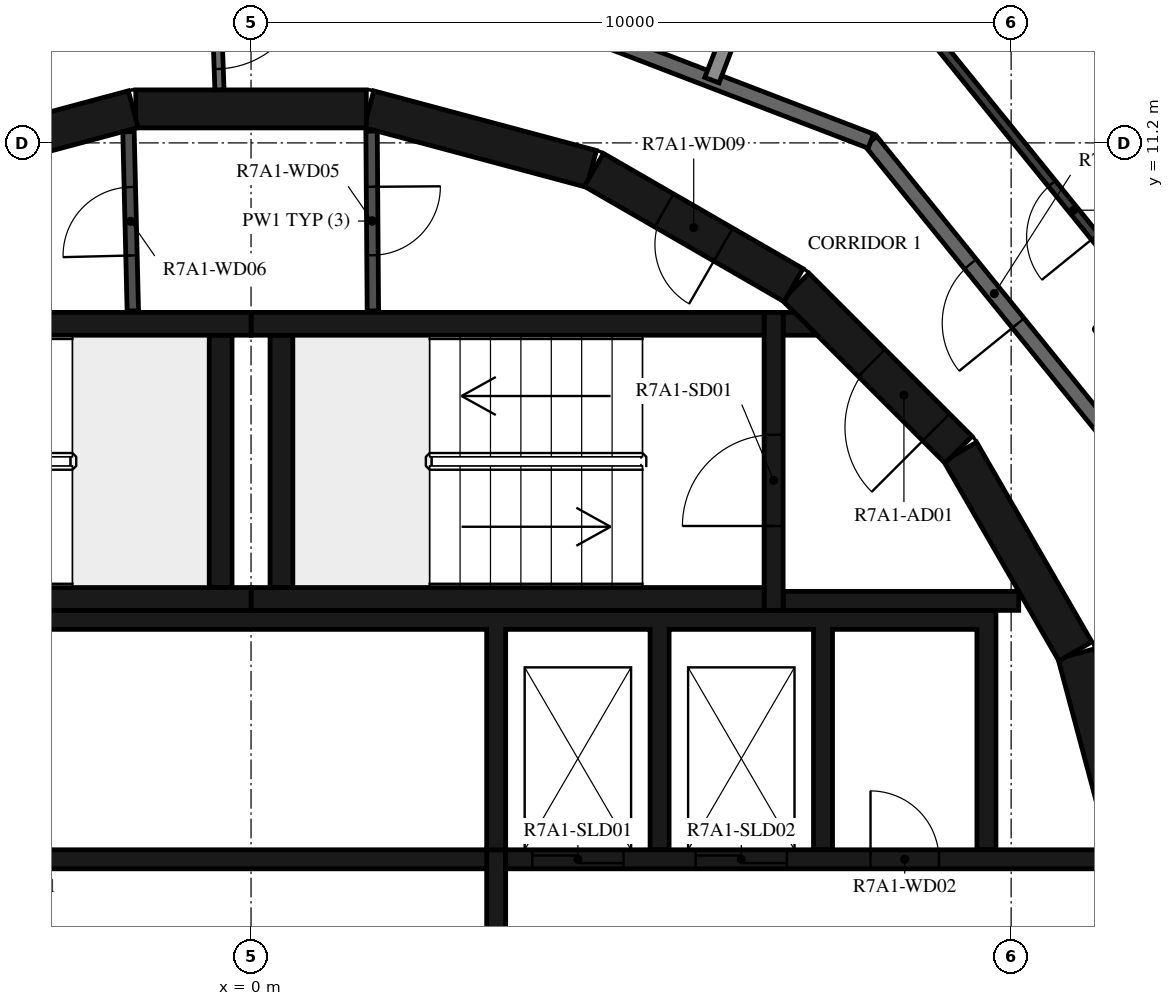
"""IFC4 building model, lengths in metres.
Left out: names, types, materials, properties, quantities, classifications, styles, units other than length and angle.
Written with IfcOpenShell. Run it as: python <this file> out.ifc"""

import sys

from ifc_helpers import new_model, si_unit, direction, frame, frame_2d, origin, place, context, subcontext, project, spatial, polyline, rectangle, outline, extrude, element, fill, save


model = new_model("IFC4")
c1 = context("Model", 3, precision=1e-05, world=origin(), true_north=direction((0.0, 1.0)))
c2 = subcontext(c1, "Body", "Model", "MODEL_VIEW")
j1 = project(units=[si_unit("LENGTHUNIT", "METRE"), si_unit("PLANEANGLEUNIT", "RADIAN")], contexts=[c1])
p1 = place(None, origin())
s1 = spatial("IfcSite", under=j1, at=p1, CompositionType="ELEMENT")
p2 = place(p1, origin())
s2 = spatial("IfcBuilding", under=s1, at=p2, CompositionType="ELEMENT")
p3 = place(p2, frame((0.0, 0.0, 266.9)))
s3 = spatial("IfcBuildingStorey", under=s2, at=p3, CompositionType="ELEMENT", Elevation=266.9)
for number, where, z_axis, x_axis in (
    (1, (11.643, 1.55, 0.0), (0.0, 0.0, 1.0), (-0.259, 0.966, 0.0)),
    (2, (10.845, 4.51, 0.0), (0.0, 0.0, 1.0), (-0.5, 0.866, 0.0)),
):
    element("IfcWall", number, at=place(p3, frame(where, z_axis=z_axis, x_axis=x_axis)), inside=s3, PredefinedType="SHEAR", context=c2, shape_type="SweptSolid", body=[
        extrude(rectangle(XDim=3.033, YDim=0.5, at=frame_2d((1.516, 0.0))), origin(), (0.0, 0.0, 1.0), 3.12),
    ])
p4 = place(p3, frame((9.308, 7.164, 0.0), z_axis=(0.0, 0.0, 1.0), x_axis=(-0.707106781187, 0.707106781187, 0.0)))
e3 = element("IfcWall", 3, at=p4, inside=s3, PredefinedType="SHEAR", context=c2, shape_type="SweptSolid", body=[
    extrude(rectangle(XDim=3.032, YDim=0.5, at=frame_2d((1.516, 0.0))), origin(), (0.0, 0.0, 1.0), 3.12),
])
p5 = place(p4, frame((0.416, 0.0, 0.0)))
e4 = element("IfcOpeningElement", 4, at=p5, cuts=e3, PredefinedType="OPENING", context=c2, shape_type="SweptSolid", body=[
    extrude(rectangle(XDim=1.2, YDim=2.1, at=frame_2d((0.6, 1.05))), frame((0.0, 0.26, 0.0), z_axis=(0.0, -1.0, 0.0), x_axis=(1.0, 0.0, 0.0)), (0.0, 0.0, 1.0), 0.52),
])
p6 = place(p3, frame((7.137, 9.329, 0.0), z_axis=(0.0, 0.0, 1.0), x_axis=(-0.865975092491, 0.500087131594, 0.0)))
e5 = element("IfcWall", 5, at=p6, inside=s3, PredefinedType="SHEAR", context=c2, shape_type="SweptSolid", body=[
    extrude(rectangle(XDim=3.033, YDim=0.5, at=frame_2d((1.516, 0.0))), origin(), (0.0, 0.0, 1.0), 3.12),
])
p7 = place(p6, frame((1.066, 0.0, 0.0)))
e6 = element("IfcOpeningElement", 6, at=p7, cuts=e5, PredefinedType="OPENING", context=c2, shape_type="SweptSolid", body=[
    extrude(rectangle(XDim=0.9, YDim=2.1, at=frame_2d((0.45, 1.05))), frame((0.0, 0.26, 0.0), z_axis=(0.0, -1.0, 0.0), x_axis=(1.0, 0.0, 0.0)), (0.0, 0.0, 1.0), 0.52),
])
for number, where, z_axis, x_axis in (
    (7, (4.479, 10.858, 0.0), (0.0, 0.0, 1.0), (-0.966, 0.259, 0.0)),
    (8, (1.516, 11.647, 0.0), (0.0, 0.0, 1.0), (-1.0, 0.0, 0.0)),
    (9, (-1.55, 11.643, 0.0), (0.0, 0.0, 1.0), (-0.966, -0.259, 0.0)),
):
    element("IfcWall", number, at=place(p3, frame(where, z_axis=z_axis, x_axis=x_axis)), inside=s3, PredefinedType="SHEAR", context=c2, shape_type="SweptSolid", body=[
        extrude(rectangle(XDim=3.033, YDim=0.5, at=frame_2d((1.516, 0.0))), origin(), (0.0, 0.0, 1.0), 3.12),
    ])
for number, where, z_axis, x_axis in (
    (10, (0.0, 5.2, 0.0), (0.0, 0.0, 1.0), (1.0, 0.0, 0.0)),
    (11, (0.0, 8.82, 0.0), (0.0, 0.0, 1.0), (1.0, 0.0, 0.0)),
):
    element("IfcWall", number, at=place(p3, frame(where, z_axis=z_axis, x_axis=x_axis)), inside=s3, PredefinedType="SHEAR", context=c2, shape_type="SweptSolid", body=[
        extrude(rectangle(XDim=6.75, YDim=0.3, at=frame_2d((3.375, 0.0))), origin(), (0.0, 0.0, 1.0), 3.12),
    ])
p8 = place(p3, frame((0.4, 5.35, 0.0), z_axis=(0.0, 0.0, 1.0), x_axis=(0.0, 1.0, 0.0)))
e12 = element("IfcWall", 12, at=p8, inside=s3, PredefinedType="SHEAR", context=c2, shape_type="SweptSolid", body=[
    extrude(rectangle(XDim=3.32, YDim=0.3, at=frame_2d((1.66, 0.0))), origin(), (0.0, 0.0, 1.0), 3.12),
])
p9 = place(p3, frame((6.875, 5.05, 0.0), z_axis=(0.0, 0.0, 1.0), x_axis=(0.0, 1.0, 0.0)))
e13 = element("IfcWall", 13, at=p9, inside=s3, PredefinedType="SHEAR", context=c2, shape_type="SweptSolid", body=[
    extrude(rectangle(XDim=3.92, YDim=0.25, at=frame_2d((1.96, 0.0))), origin(), (0.0, 0.0, 1.0), 3.12),
])
p10 = place(p9, frame((1.11, 0.0, 0.0)))
e14 = element("IfcOpeningElement", 14, at=p10, cuts=e13, PredefinedType="OPENING", context=c2, shape_type="SweptSolid", body=[
    extrude(rectangle(XDim=1.2, YDim=2.1, at=frame_2d((0.6, 1.05))), frame((0.0, 0.135, 0.0), z_axis=(0.0, -1.0, 0.0), x_axis=(1.0, 0.0, 0.0)), (0.0, 0.0, 1.0), 0.27),
])
p11 = place(p3, frame((7.0, 5.175, 0.0), z_axis=(0.0, 0.0, 1.0), x_axis=(1.0, 0.0, 0.0)))
e15 = element("IfcWall", 15, at=p11, inside=s3, PredefinedType="SHEAR", context=c2, shape_type="SweptSolid", body=[
    extrude(rectangle(XDim=3.1, YDim=0.25, at=frame_2d((1.55, 0.0))), origin(), (0.0, 0.0, 1.0), 3.12),
])
p12 = place(p3, origin())
e16 = element("IfcWall", 16, at=p12, inside=s3, PredefinedType="SHEAR", context=c2, shape_type="SweptSolid", body=[
    extrude(outline(polyline([(7.448, 8.67), (7.0, 8.67), (7.0, 8.97), (7.148, 8.97), (7.448, 8.67)])), origin(), (0.0, 0.0, 1.0), 3.12),
])
for number, where, z_axis, x_axis in (
    (17, (-6.75, 5.2, 0.0), (0.0, 0.0, 1.0), (1.0, 0.0, 0.0)),
    (18, (-6.75, 8.82, 0.0), (0.0, 0.0, 1.0), (1.0, 0.0, 0.0)),
):
    element("IfcWall", number, at=place(p3, frame(where, z_axis=z_axis, x_axis=x_axis)), inside=s3, PredefinedType="SHEAR", context=c2, shape_type="SweptSolid", body=[
        extrude(rectangle(XDim=6.75, YDim=0.3, at=frame_2d((3.375, 0.0))), origin(), (0.0, 0.0, 1.0), 3.12),
    ])
p13 = place(p3, frame((-0.4, 5.35, 0.0), z_axis=(0.0, 0.0, 1.0), x_axis=(0.0, 1.0, 0.0)))
e19 = element("IfcWall", 19, at=p13, inside=s3, PredefinedType="SHEAR", context=c2, shape_type="SweptSolid", body=[
    extrude(rectangle(XDim=3.32, YDim=0.3, at=frame_2d((1.66, 0.0))), origin(), (0.0, 0.0, 1.0), 3.12),
])
p14 = place(p3, origin())
e20 = element("IfcWall", 20, at=p14, inside=s3, PredefinedType="SHEAR", context=c2, shape_type="SweptSolid", body=[
    extrude(outline(polyline([(-9.8, 1.9), (-9.55, 1.9), (-9.55, 4.8), (3.1, 4.8), (3.1, 1.9), (3.35, 1.9), (3.35, 4.8), (5.25, 4.8), (5.25, 1.9), (5.5, 1.9), (5.5, 4.8), (7.4, 4.8), (7.4, 1.9), (7.65, 1.9), (7.65, 4.8), (9.55, 4.8), (9.55, 1.9), (9.8, 1.9), (9.8, 4.8), (9.8, 5.05), (-9.8, 5.05), (-9.8, 4.8), (-9.8, 1.9)])), origin(), (0.0, 0.0, 1.0), 3.12),
])
p15 = place(p3, frame((-11.28, 1.775, 0.0), z_axis=(0.0, 0.0, 1.0), x_axis=(1.0, 0.0, 0.0)))
e21 = element("IfcWall", 21, at=p15, inside=s3, PredefinedType="SHEAR", context=c2, shape_type="SweptSolid", body=[
    extrude(rectangle(XDim=14.38, YDim=0.25, at=frame_2d((7.19, 0.0))), origin(), (0.0, 0.0, 1.0), 3.12),
])
p16 = place(p15, frame((7.605, 0.0, 0.0)))
e22 = element("IfcOpeningElement", 22, at=p16, cuts=e21, PredefinedType="OPENING", context=c2, shape_type="SweptSolid", body=[
    extrude(rectangle(XDim=0.9, YDim=2.1, at=frame_2d((0.45, 1.05))), frame((0.0, 0.135, 0.0), z_axis=(0.0, -1.0, 0.0), x_axis=(1.0, 0.0, 0.0)), (0.0, 0.0, 1.0), 0.27),
])
p17 = place(p3, frame((3.35, 1.775, 0.0), z_axis=(0.0, 0.0, 1.0), x_axis=(1.0, 0.0, 0.0)))
e23 = element("IfcWall", 23, at=p17, inside=s3, PredefinedType="SHEAR", context=c2, shape_type="SweptSolid", body=[
    extrude(rectangle(XDim=7.93, YDim=0.25, at=frame_2d((3.965, 0.0))), origin(), (0.0, 0.0, 1.0), 3.12),
])
p18 = place(p17, frame((0.35, 0.0, 0.0)))
e24 = element("IfcOpeningElement", 24, at=p18, cuts=e23, PredefinedType="OPENING", context=c2, shape_type="SweptSolid", body=[
    extrude(rectangle(XDim=1.2, YDim=2.4, at=frame_2d((0.6, 1.2))), frame((0.0, 0.135, 0.0), z_axis=(0.0, -1.0, 0.0), x_axis=(1.0, 0.0, 0.0)), (0.0, 0.0, 1.0), 0.27),
])
p19 = place(p17, frame((2.5, 0.0, 0.0)))
e25 = element("IfcOpeningElement", 25, at=p19, cuts=e23, PredefinedType="OPENING", context=c2, shape_type="SweptSolid", body=[
    extrude(rectangle(XDim=1.2, YDim=2.4, at=frame_2d((0.6, 1.2))), frame((0.0, 0.135, 0.0), z_axis=(0.0, -1.0, 0.0), x_axis=(1.0, 0.0, 0.0)), (0.0, 0.0, 1.0), 0.27),
])
p20 = place(p17, frame((4.8, 0.0, 0.0)))
e26 = element("IfcOpeningElement", 26, at=p20, cuts=e23, PredefinedType="OPENING", context=c2, shape_type="SweptSolid", body=[
    extrude(rectangle(XDim=0.9, YDim=2.1, at=frame_2d((0.45, 1.05))), frame((0.0, 0.135, 0.0), z_axis=(0.0, -1.0, 0.0), x_axis=(1.0, 0.0, 0.0)), (0.0, 0.0, 1.0), 0.27),
])
p21 = place(p3, frame((3.225, -1.9, 0.0), z_axis=(0.0, 0.0, 1.0), x_axis=(0.0, 1.0, 0.0)))
e27 = element("IfcWall", 27, at=p21, inside=s3, PredefinedType="SHEAR", context=c2, shape_type="SweptSolid", body=[
    extrude(rectangle(XDim=3.8, YDim=0.25, at=frame_2d((1.9, 0.0))), origin(), (0.0, 0.0, 1.0), 3.12),
])
p22 = place(p3, frame((1.586, 11.354, 0.0), z_axis=(0.0, 0.0, 1.0), x_axis=(0.007227482881, -0.999973881405, 0.0)))
e28 = element("IfcWall", 28, at=p22, inside=s3, PredefinedType="PARTITIONING", context=c2, shape_type="SweptSolid", body=[
    extrude(rectangle(XDim=2.365, YDim=0.15, at=frame_2d((1.182, 0.0))), origin(), (0.0, 0.0, 1.0), 3.12),
])
p23 = place(p22, frame((0.732, 0.0, 0.0)))
e29 = element("IfcOpeningElement", 29, at=p23, cuts=e28, PredefinedType="OPENING", context=c2, shape_type="SweptSolid", body=[
    extrude(rectangle(XDim=0.9, YDim=2.1, at=frame_2d((0.45, 1.05))), frame((0.0, 0.085, 0.0), z_axis=(0.0, -1.0, 0.0), x_axis=(1.0, 0.0, 0.0)), (0.0, 0.0, 1.0), 0.17),
])
p24 = place(p3, frame((-1.555, 8.99, 0.0), z_axis=(0.0, 0.0, 1.0), x_axis=(-0.024125549686, 0.999708936567, 0.0)))
e30 = element("IfcWall", 30, at=p24, inside=s3, PredefinedType="PARTITIONING", context=c2, shape_type="SweptSolid", body=[
    extrude(rectangle(XDim=2.358, YDim=0.15, at=frame_2d((1.179, 0.0))), origin(), (0.0, 0.0, 1.0), 3.12),
])
p25 = place(p24, frame((0.729, 0.0, 0.0)))
e31 = element("IfcOpeningElement", 31, at=p25, cuts=e30, PredefinedType="OPENING", context=c2, shape_type="SweptSolid", body=[
    extrude(rectangle(XDim=0.9, YDim=2.1, at=frame_2d((0.45, 1.05))), frame((0.0, 0.085, 0.0), z_axis=(0.0, -1.0, 0.0), x_axis=(1.0, 0.0, 0.0)), (0.0, 0.0, 1.0), 0.17),
])
p26 = place(p3, frame((-0.471, 13.492, 0.0), z_axis=(0.0, 0.0, 1.0), x_axis=(0.034873173869, -0.999391745886, 0.0)))
e32 = element("IfcWall", 32, at=p26, inside=s3, PredefinedType="PARTITIONING", context=c2, shape_type="SweptSolid", body=[
    extrude(rectangle(XDim=1.596, YDim=0.12, at=frame_2d((0.798, 0.0))), origin(), (0.0, 0.0, 1.0), 3.12),
])
p27 = place(p26, frame((0.12, 0.0, 0.0)))
e33 = element("IfcOpeningElement", 33, at=p27, cuts=e32, PredefinedType="OPENING", context=c2, shape_type="SweptSolid", body=[
    extrude(rectangle(XDim=1.2, YDim=2.1, at=frame_2d((0.6, 1.05))), frame((0.0, 0.07, 0.0), z_axis=(0.0, -1.0, 0.0), x_axis=(1.0, 0.0, 0.0)), (0.0, 0.0, 1.0), 0.14),
])
p28 = place(p3, frame((12.673, 5.643, 0.0), z_axis=(0.0, 0.0, 1.0), x_axis=(-0.629302871585, 0.777160148113, 0.0)))
e34 = element("IfcWall", 34, at=p28, inside=s3, PredefinedType="STANDARD", context=c2, shape_type="SweptSolid", body=[
    extrude(rectangle(XDim=7.181, YDim=0.2, at=frame_2d((3.59, 0.0))), origin(), (0.0, 0.0, 1.0), 3.12),
])
p29 = place(p28, frame((4.1, 0.0, 0.0)))
e35 = element("IfcOpeningElement", 35, at=p29, cuts=e34, PredefinedType="OPENING", context=c2, shape_type="SweptSolid", body=[
    extrude(rectangle(XDim=1.0, YDim=2.1, at=frame_2d((0.5, 1.05))), frame((0.0, 0.11, 0.0), z_axis=(0.0, -1.0, 0.0), x_axis=(1.0, 0.0, 0.0)), (0.0, 0.0, 1.0), 0.22),
])
p30 = place(p3, frame((8.154, 11.223, 0.0), z_axis=(0.0, 0.0, 1.0), x_axis=(-0.93359073609, 0.358341090983, 0.0)))
e36 = element("IfcWall", 36, at=p30, inside=s3, PredefinedType="STANDARD", context=c2, shape_type="SweptSolid", body=[
    extrude(rectangle(XDim=7.181, YDim=0.2, at=frame_2d((3.59, 0.0))), origin(), (0.0, 0.0, 1.0), 3.12),
])
p31 = place(p3, frame((7.532, 15.85, 0.0), z_axis=(0.0, 0.0, 1.0), x_axis=(-0.358355996975, -0.933585014571, 0.0)))
e37 = element("IfcWall", 37, at=p31, inside=s3, PredefinedType="STANDARD", context=c2, shape_type="SweptSolid", body=[
    extrude(rectangle(XDim=4.096, YDim=0.2, at=frame_2d((2.048, 0.0))), origin(), (0.0, 0.0, 1.0), 2.73),
])
p32 = place(p3, frame((14.092, 6.274, 0.0), z_axis=(0.0, 0.0, 1.0), x_axis=(-0.62933367237, 0.777135206268, 0.0)))
e38 = element("IfcWall", 38, at=p32, inside=s3, PredefinedType="PARTITIONING", context=c2, shape_type="SweptSolid", body=[
    extrude(rectangle(XDim=7.985, YDim=0.12, at=frame_2d((3.992, 0.0))), origin(), (0.0, 0.0, 1.0), 3.12),
])
p33 = place(p32, frame((1.378, 0.0, 0.0)))
e39 = element("IfcOpeningElement", 39, at=p33, cuts=e38, PredefinedType="OPENING", context=c2, shape_type="SweptSolid", body=[
    extrude(rectangle(XDim=0.9, YDim=2.1, at=frame_2d((0.45, 1.05))), frame((0.0, 0.07, 0.0), z_axis=(0.0, -1.0, 0.0), x_axis=(1.0, 0.0, 0.0)), (0.0, 0.0, 1.0), 0.14),
])
p34 = place(p32, frame((4.749, 0.0, 0.0)))
e40 = element("IfcOpeningElement", 40, at=p34, cuts=e38, PredefinedType="OPENING", context=c2, shape_type="SweptSolid", body=[
    extrude(rectangle(XDim=0.9, YDim=2.1, at=frame_2d((0.45, 1.05))), frame((0.0, 0.07, 0.0), z_axis=(0.0, -1.0, 0.0), x_axis=(1.0, 0.0, 0.0)), (0.0, 0.0, 1.0), 0.14),
])
p35 = place(p10, origin())
e41 = element("IfcDoor", 41, at=p35, inside=s3, OperationType="SINGLE_SWING_LEFT", PredefinedType="DOOR", context=c2, shape_type="SweptSolid", body=[
    extrude(rectangle(XDim=1.2, YDim=2.1, at=frame_2d((0.6, 1.05))), frame((0.0, 0.025, 0.0), z_axis=(0.0, -1.0, 0.0), x_axis=(1.0, 0.0, 0.0)), (0.0, 0.0, 1.0), 0.05),
])
fill(e14, e41)
p36 = place(p5, origin())
e42 = element("IfcDoor", 42, at=p36, inside=s3, OperationType="SINGLE_SWING_RIGHT", PredefinedType="DOOR", context=c2, shape_type="SweptSolid", body=[
    extrude(rectangle(XDim=1.2, YDim=2.1, at=frame_2d((0.6, 1.05))), frame((0.0, 0.025, 0.0), z_axis=(0.0, -1.0, 0.0), x_axis=(1.0, 0.0, 0.0)), (0.0, 0.0, 1.0), 0.05),
])
fill(e4, e42)
p37 = place(p18, origin())
e43 = element("IfcDoor", 43, at=p37, inside=s3, OperationType="DOUBLE_DOOR_SLIDING", PredefinedType="DOOR", context=c2, shape_type="SweptSolid", body=[
    extrude(rectangle(XDim=1.2, YDim=2.4, at=frame_2d((0.6, 1.2))), frame((0.0, 0.025, 0.0), z_axis=(0.0, -1.0, 0.0), x_axis=(1.0, 0.0, 0.0)), (0.0, 0.0, 1.0), 0.05),
])
fill(e24, e43)
p38 = place(p19, origin())
e44 = element("IfcDoor", 44, at=p38, inside=s3, OperationType="DOUBLE_DOOR_SLIDING", PredefinedType="DOOR", context=c2, shape_type="SweptSolid", body=[
    extrude(rectangle(XDim=1.2, YDim=2.4, at=frame_2d((0.6, 1.2))), frame((0.0, 0.025, 0.0), z_axis=(0.0, -1.0, 0.0), x_axis=(1.0, 0.0, 0.0)), (0.0, 0.0, 1.0), 0.05),
])
fill(e25, e44)
p39 = place(p20, origin())
e45 = element("IfcDoor", 45, at=p39, inside=s3, OperationType="SINGLE_SWING_RIGHT", PredefinedType="DOOR", context=c2, shape_type="SweptSolid", body=[
    extrude(rectangle(XDim=0.9, YDim=2.1, at=frame_2d((0.45, 1.05))), frame((0.0, 0.025, 0.0), z_axis=(0.0, -1.0, 0.0), x_axis=(1.0, 0.0, 0.0)), (0.0, 0.0, 1.0), 0.05),
])
fill(e26, e45)
p40 = place(p23, origin())
e46 = element("IfcDoor", 46, at=p40, inside=s3, OperationType="SINGLE_SWING_LEFT", PredefinedType="DOOR", context=c2, shape_type="SweptSolid", body=[
    extrude(rectangle(XDim=0.9, YDim=2.1, at=frame_2d((0.45, 1.05))), frame((0.0, 0.025, 0.0), z_axis=(0.0, -1.0, 0.0), x_axis=(1.0, 0.0, 0.0)), (0.0, 0.0, 1.0), 0.05),
])
fill(e29, e46)
p41 = place(p25, origin())
e47 = element("IfcDoor", 47, at=p41, inside=s3, OperationType="SINGLE_SWING_RIGHT", PredefinedType="DOOR", context=c2, shape_type="SweptSolid", body=[
    extrude(rectangle(XDim=0.9, YDim=2.1, at=frame_2d((0.45, 1.05))), frame((0.0, 0.025, 0.0), z_axis=(0.0, -1.0, 0.0), x_axis=(1.0, 0.0, 0.0)), (0.0, 0.0, 1.0), 0.05),
])
fill(e31, e47)
p42 = place(p7, origin())
e48 = element("IfcDoor", 48, at=p42, inside=s3, OperationType="SINGLE_SWING_LEFT", PredefinedType="DOOR", context=c2, shape_type="SweptSolid", body=[
    extrude(rectangle(XDim=0.9, YDim=2.1, at=frame_2d((0.45, 1.05))), frame((0.0, 0.025, 0.0), z_axis=(0.0, -1.0, 0.0), x_axis=(1.0, 0.0, 0.0)), (0.0, 0.0, 1.0), 0.05),
])
fill(e6, e48)
p43 = place(p29, origin())
e49 = element("IfcDoor", 49, at=p43, inside=s3, OperationType="SINGLE_SWING_LEFT", PredefinedType="DOOR", context=c2, shape_type="SweptSolid", body=[
    extrude(rectangle(XDim=1.0, YDim=2.1, at=frame_2d((0.5, 1.05))), frame((0.0, 0.025, 0.0), z_axis=(0.0, -1.0, 0.0), x_axis=(1.0, 0.0, 0.0)), (0.0, 0.0, 1.0), 0.05),
])
fill(e35, e49)
p44 = place(p34, origin())
e50 = element("IfcDoor", 50, at=p44, inside=s3, OperationType="SINGLE_SWING_LEFT", PredefinedType="DOOR", context=c2, shape_type="SweptSolid", body=[
    extrude(rectangle(XDim=0.9, YDim=2.1, at=frame_2d((0.45, 1.05))), frame((0.0, 0.025, 0.0), z_axis=(0.0, -1.0, 0.0), x_axis=(1.0, 0.0, 0.0)), (0.0, 0.0, 1.0), 0.05),
])
fill(e40, e50)
p45 = place(p27, origin())
e51 = element("IfcDoor", 51, at=p45, inside=s3, OperationType="DOUBLE_DOOR_SINGLE_SWING", PredefinedType="DOOR", context=c2, shape_type="SweptSolid", body=[
    extrude(rectangle(XDim=1.2, YDim=2.1, at=frame_2d((0.6, 1.05))), frame((0.0, 0.025, 0.0), z_axis=(0.0, -1.0, 0.0), x_axis=(1.0, 0.0, 0.0)), (0.0, 0.0, 1.0), 0.05),
])
fill(e33, e51)
save(model, sys.argv[1])
